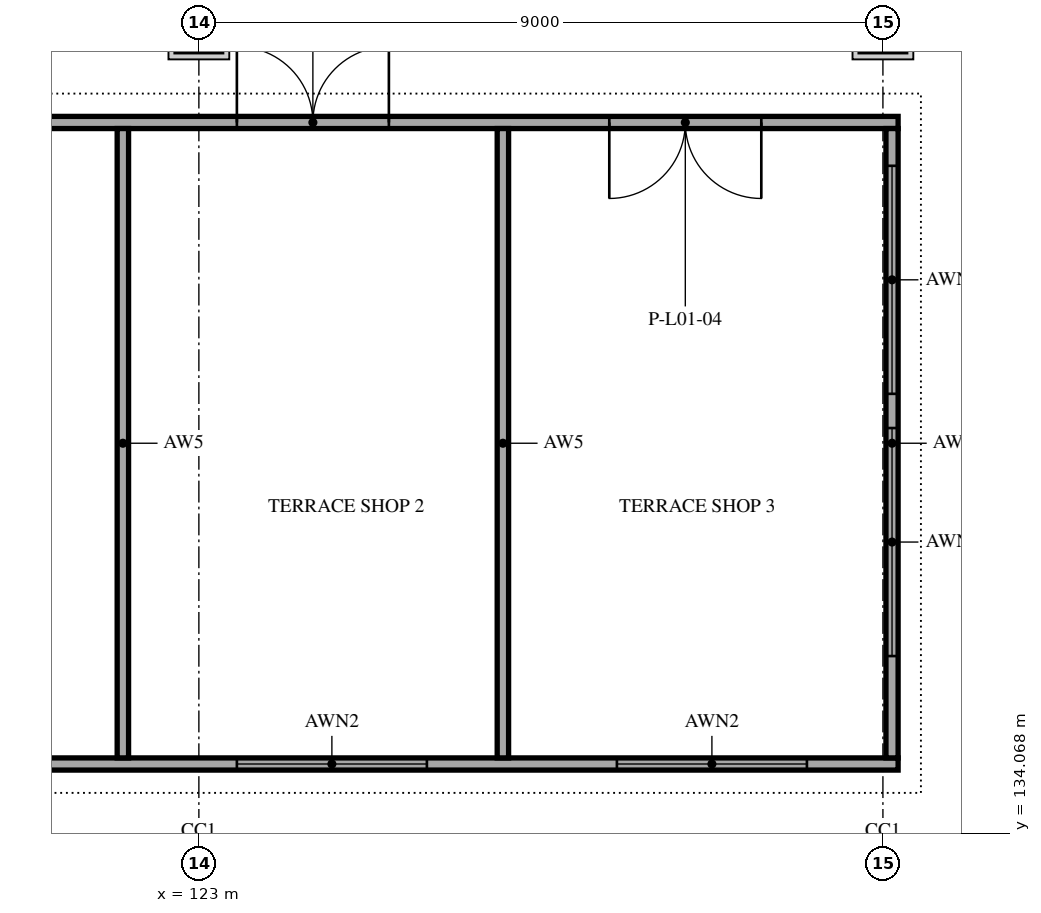
"""IFC4 building model, lengths in metres.
Left out: names, types, materials, properties, quantities, classifications, styles, units other than length and angle.
Written with IfcOpenShell. Run it as: python <this file> out.ifc"""

import sys

from ifc_helpers import new_model, si_unit, direction, frame, frame_2d, origin, place, context, subcontext, project, spatial, rectangle, extrude, element, fill, save


model = new_model("IFC4")
c1 = context("Model", 3, precision=1e-05, world=origin(), true_north=direction((0.0, 1.0)))
c2 = subcontext(c1, "Body", "Model", "MODEL_VIEW")
j1 = project(units=[si_unit("LENGTHUNIT", "METRE"), si_unit("PLANEANGLEUNIT", "RADIAN")], contexts=[c1])
p1 = place(None, origin())
s1 = spatial("IfcSite", under=j1, at=p1, CompositionType="ELEMENT")
p2 = place(p1, origin())
s2 = spatial("IfcBuilding", under=s1, at=p2, CompositionType="ELEMENT")
p3 = place(p2, frame((0.0, 0.0, 5.0)))
s3 = spatial("IfcBuildingStorey", under=s2, at=p3, CompositionType="ELEMENT", Elevation=5.0)
p4 = place(p3, frame((95.8, 134.98, 0.0), z_axis=(0.0, 0.0, 1.0), x_axis=(1.0, 0.0, 0.0)))
e1 = element("IfcWall", 1, at=p4, inside=s3, PredefinedType="STANDARD", context=c2, shape_type="SweptSolid", body=[
    extrude(rectangle(XDim=36.4, YDim=0.16, at=frame_2d((18.2, 0.0))), origin(), (0.0, 0.0, 1.0), 2.6),
])
p5 = place(p4, frame((10.7, 0.0, 0.0)))
e2 = element("IfcOpeningElement", 2, at=p5, cuts=e1, PredefinedType="OPENING", context=c2, shape_type="SweptSolid", body=[
    extrude(rectangle(XDim=2.0, YDim=2.4, at=frame_2d((1.0, 1.2))), frame((0.0, 0.09, 0.0), z_axis=(0.0, -1.0, 0.0), x_axis=(1.0, 0.0, 0.0)), (0.0, 0.0, 1.0), 0.18),
])
p6 = place(p4, frame((19.7, 0.0, 0.0)))
e3 = element("IfcOpeningElement", 3, at=p6, cuts=e1, PredefinedType="OPENING", context=c2, shape_type="SweptSolid", body=[
    extrude(rectangle(XDim=2.0, YDim=2.4, at=frame_2d((1.0, 1.2))), frame((0.0, 0.09, 0.0), z_axis=(0.0, -1.0, 0.0), x_axis=(1.0, 0.0, 0.0)), (0.0, 0.0, 1.0), 0.18),
])
p7 = place(p4, frame((2.2, 0.0, 0.8)))
e4 = element("IfcOpeningElement", 4, at=p7, cuts=e1, PredefinedType="OPENING", context=c2, shape_type="SweptSolid", body=[
    extrude(rectangle(XDim=3.0, YDim=2.0, at=frame_2d((1.5, 1.0))), frame((0.0, 0.09, 0.0), z_axis=(0.0, -1.0, 0.0), x_axis=(1.0, 0.0, 0.0)), (0.0, 0.0, 1.0), 0.18),
])
p8 = place(p4, frame((13.7, 0.0, 0.8)))
e5 = element("IfcOpeningElement", 5, at=p8, cuts=e1, PredefinedType="OPENING", context=c2, shape_type="SweptSolid", body=[
    extrude(rectangle(XDim=3.0, YDim=2.0, at=frame_2d((1.5, 1.0))), frame((0.0, 0.09, 0.0), z_axis=(0.0, -1.0, 0.0), x_axis=(1.0, 0.0, 0.0)), (0.0, 0.0, 1.0), 0.18),
])
p9 = place(p4, frame((22.2, 0.0, 0.8)))
e6 = element("IfcOpeningElement", 6, at=p9, cuts=e1, PredefinedType="OPENING", context=c2, shape_type="SweptSolid", body=[
    extrude(rectangle(XDim=3.0, YDim=2.0, at=frame_2d((1.5, 1.0))), frame((0.0, 0.09, 0.0), z_axis=(0.0, -1.0, 0.0), x_axis=(1.0, 0.0, 0.0)), (0.0, 0.0, 1.0), 0.18),
])
p10 = place(p4, frame((27.7, 0.0, 0.8)))
e7 = element("IfcOpeningElement", 7, at=p10, cuts=e1, PredefinedType="OPENING", context=c2, shape_type="SweptSolid", body=[
    extrude(rectangle(XDim=2.5, YDim=2.0, at=frame_2d((1.25, 1.0))), frame((0.0, 0.09, 0.0), z_axis=(0.0, -1.0, 0.0), x_axis=(1.0, 0.0, 0.0)), (0.0, 0.0, 1.0), 0.18),
])
p11 = place(p4, frame((32.7, 0.0, 0.8)))
e8 = element("IfcOpeningElement", 8, at=p11, cuts=e1, PredefinedType="OPENING", context=c2, shape_type="SweptSolid", body=[
    extrude(rectangle(XDim=2.5, YDim=2.0, at=frame_2d((1.25, 1.0))), frame((0.0, 0.09, 0.0), z_axis=(0.0, -1.0, 0.0), x_axis=(1.0, 0.0, 0.0)), (0.0, 0.0, 1.0), 0.18),
])
p12 = place(p3, frame((95.8, 143.42, 0.0), z_axis=(0.0, 0.0, 1.0), x_axis=(1.0, 0.0, 0.0)))
e9 = element("IfcWall", 9, at=p12, inside=s3, PredefinedType="STANDARD", context=c2, shape_type="SweptSolid", body=[
    extrude(rectangle(XDim=36.4, YDim=0.16, at=frame_2d((18.2, 0.0))), origin(), (0.0, 0.0, 1.0), 2.6),
])
p13 = place(p12, frame((2.2, 0.0, 0.8)))
e10 = element("IfcOpeningElement", 10, at=p13, cuts=e9, PredefinedType="OPENING", context=c2, shape_type="SweptSolid", body=[
    extrude(rectangle(XDim=3.0, YDim=2.0, at=frame_2d((1.5, 1.0))), frame((0.0, 0.09, 0.0), z_axis=(0.0, -1.0, 0.0), x_axis=(1.0, 0.0, 0.0)), (0.0, 0.0, 1.0), 0.18),
])
p14 = place(p12, frame((8.2, 0.0, 0.8)))
e11 = element("IfcOpeningElement", 11, at=p14, cuts=e9, PredefinedType="OPENING", context=c2, shape_type="SweptSolid", body=[
    extrude(rectangle(XDim=3.0, YDim=2.0, at=frame_2d((1.5, 1.0))), frame((0.0, 0.09, 0.0), z_axis=(0.0, -1.0, 0.0), x_axis=(1.0, 0.0, 0.0)), (0.0, 0.0, 1.0), 0.18),
])
p15 = place(p12, frame((14.2, 0.0, 0.8)))
e12 = element("IfcOpeningElement", 12, at=p15, cuts=e9, PredefinedType="OPENING", context=c2, shape_type="SweptSolid", body=[
    extrude(rectangle(XDim=3.0, YDim=2.0, at=frame_2d((1.5, 1.0))), frame((0.0, 0.09, 0.0), z_axis=(0.0, -1.0, 0.0), x_axis=(1.0, 0.0, 0.0)), (0.0, 0.0, 1.0), 0.18),
])
p16 = place(p12, frame((20.2, 0.0, 0.8)))
e13 = element("IfcOpeningElement", 13, at=p16, cuts=e9, PredefinedType="OPENING", context=c2, shape_type="SweptSolid", body=[
    extrude(rectangle(XDim=3.0, YDim=2.0, at=frame_2d((1.5, 1.0))), frame((0.0, 0.09, 0.0), z_axis=(0.0, -1.0, 0.0), x_axis=(1.0, 0.0, 0.0)), (0.0, 0.0, 1.0), 0.18),
])
p17 = place(p12, frame((27.7, 0.0, 0.0)))
e14 = element("IfcOpeningElement", 14, at=p17, cuts=e9, PredefinedType="OPENING", context=c2, shape_type="SweptSolid", body=[
    extrude(rectangle(XDim=2.0, YDim=2.4, at=frame_2d((1.0, 1.2))), frame((0.0, 0.09, 0.0), z_axis=(0.0, -1.0, 0.0), x_axis=(1.0, 0.0, 0.0)), (0.0, 0.0, 1.0), 0.18),
])
p18 = place(p12, frame((32.6, 0.0, 0.0)))
e15 = element("IfcOpeningElement", 15, at=p18, cuts=e9, PredefinedType="OPENING", context=c2, shape_type="SweptSolid", body=[
    extrude(rectangle(XDim=2.0, YDim=2.4, at=frame_2d((1.0, 1.2))), frame((0.0, 0.09, 0.0), z_axis=(0.0, -1.0, 0.0), x_axis=(1.0, 0.0, 0.0)), (0.0, 0.0, 1.0), 0.18),
])
p19 = place(p3, frame((132.12, 135.06, 0.0), z_axis=(0.0, 0.0, 1.0), x_axis=(0.0, 1.0, 0.0)))
e16 = element("IfcWall", 16, at=p19, inside=s3, PredefinedType="STANDARD", context=c2, shape_type="SweptSolid", body=[
    extrude(rectangle(XDim=8.28, YDim=0.16, at=frame_2d((4.14, 0.0))), origin(), (0.0, 0.0, 1.0), 2.6),
])
p20 = place(p19, frame((1.34, 0.0, 0.8)))
e17 = element("IfcOpeningElement", 17, at=p20, cuts=e16, PredefinedType="OPENING", context=c2, shape_type="SweptSolid", body=[
    extrude(rectangle(XDim=3.0, YDim=2.0, at=frame_2d((1.5, 1.0))), frame((0.0, 0.09, 0.0), z_axis=(0.0, -1.0, 0.0), x_axis=(1.0, 0.0, 0.0)), (0.0, 0.0, 1.0), 0.18),
])
p21 = place(p19, frame((4.79, 0.0, 0.8)))
e18 = element("IfcOpeningElement", 18, at=p21, cuts=e16, PredefinedType="OPENING", context=c2, shape_type="SweptSolid", body=[
    extrude(rectangle(XDim=3.0, YDim=2.0, at=frame_2d((1.5, 1.0))), frame((0.0, 0.09, 0.0), z_axis=(0.0, -1.0, 0.0), x_axis=(1.0, 0.0, 0.0)), (0.0, 0.0, 1.0), 0.18),
])
for number, where, z_axis, x_axis in (
    (19, (122.0, 135.06, 0.0), (0.0, 0.0, 1.0), (0.0, 1.0, 0.0)),
    (20, (127.0, 135.06, 0.0), (0.0, 0.0, 1.0), (0.0, 1.0, 0.0)),
):
    element("IfcWall", number, at=place(p3, frame(where, z_axis=z_axis, x_axis=x_axis)), inside=s3, PredefinedType="STANDARD", context=c2, shape_type="SweptSolid", body=[
        extrude(rectangle(XDim=8.28, YDim=0.15, at=frame_2d((4.14, 0.0))), origin(), (0.0, 0.0, 1.0), 2.6),
    ])
p22 = place(p10, origin())
e21 = element("IfcWindow", 21, at=p22, inside=s3, PartitioningType="SINGLE_PANEL", PredefinedType="WINDOW", context=c2, shape_type="SweptSolid", body=[
    extrude(rectangle(XDim=2.5, YDim=2.0, at=frame_2d((1.25, 1.0))), frame((0.0, 0.03, 0.0), z_axis=(0.0, -1.0, 0.0), x_axis=(1.0, 0.0, 0.0)), (0.0, 0.0, 1.0), 0.06),
])
fill(e7, e21)
p23 = place(p11, origin())
e22 = element("IfcWindow", 22, at=p23, inside=s3, PartitioningType="SINGLE_PANEL", PredefinedType="WINDOW", context=c2, shape_type="SweptSolid", body=[
    extrude(rectangle(XDim=2.5, YDim=2.0, at=frame_2d((1.25, 1.0))), frame((0.0, 0.03, 0.0), z_axis=(0.0, -1.0, 0.0), x_axis=(1.0, 0.0, 0.0)), (0.0, 0.0, 1.0), 0.06),
])
fill(e8, e22)
p24 = place(p17, origin())
e23 = element("IfcDoor", 23, at=p24, inside=s3, OperationType="DOUBLE_DOOR_SINGLE_SWING", PredefinedType="NOTDEFINED", context=c2, shape_type="SweptSolid", body=[
    extrude(rectangle(XDim=2.0, YDim=2.4, at=frame_2d((1.0, 1.2))), frame((0.0, 0.025, 0.0), z_axis=(0.0, -1.0, 0.0), x_axis=(1.0, 0.0, 0.0)), (0.0, 0.0, 1.0), 0.05),
])
fill(e14, e23)
p25 = place(p18, frame((2.0, 0.0, 0.0), z_axis=(0.0, 0.0, 1.0), x_axis=(-1.0, 0.0, 0.0)))
e24 = element("IfcDoor", 24, at=p25, inside=s3, OperationType="DOUBLE_DOOR_SINGLE_SWING", PredefinedType="NOTDEFINED", context=c2, shape_type="SweptSolid", body=[
    extrude(rectangle(XDim=2.0, YDim=2.4, at=frame_2d((1.0, 1.2))), frame((0.0, 0.025, 0.0), z_axis=(0.0, -1.0, 0.0), x_axis=(1.0, 0.0, 0.0)), (0.0, 0.0, 1.0), 0.05),
])
fill(e15, e24)
p26 = place(p20, origin())
e25 = element("IfcWindow", 25, at=p26, inside=s3, PartitioningType="SINGLE_PANEL", PredefinedType="WINDOW", context=c2, shape_type="SweptSolid", body=[
    extrude(rectangle(XDim=3.0, YDim=2.0, at=frame_2d((1.5, 1.0))), frame((0.0, 0.03, 0.0), z_axis=(0.0, -1.0, 0.0), x_axis=(1.0, 0.0, 0.0)), (0.0, 0.0, 1.0), 0.06),
])
fill(e17, e25)
p27 = place(p21, origin())
e26 = element("IfcWindow", 26, at=p27, inside=s3, PartitioningType="SINGLE_PANEL", PredefinedType="WINDOW", context=c2, shape_type="SweptSolid", body=[
    extrude(rectangle(XDim=3.0, YDim=2.0, at=frame_2d((1.5, 1.0))), frame((0.0, 0.03, 0.0), z_axis=(0.0, -1.0, 0.0), x_axis=(1.0, 0.0, 0.0)), (0.0, 0.0, 1.0), 0.06),
])
fill(e18, e26)
save(model, sys.argv[1])
